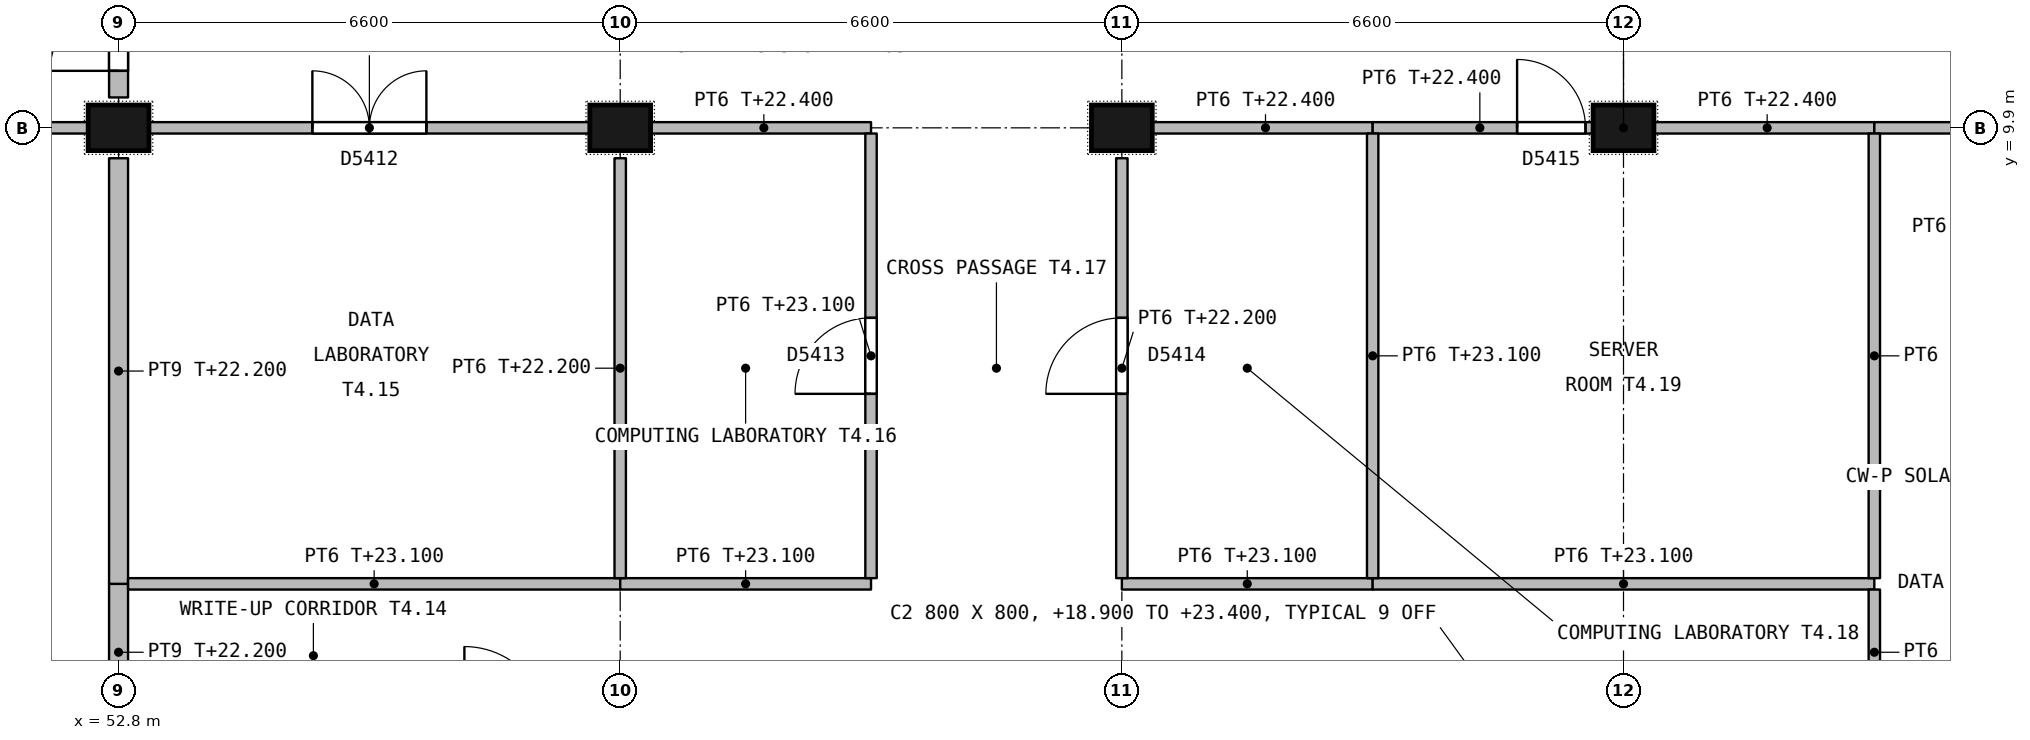
"""IFC4 building model, lengths in metres.
Left out: names, types, materials, properties, quantities, classifications, styles, units other than length and angle.
Written with IfcOpenShell. Run it as: python <this file> out.ifc"""

import sys

from ifc_helpers import new_model, si_unit, direction, frame, frame_2d, origin, origin_2d, place, context, subcontext, project, spatial, rectangle, extrude, element, fill, save


model = new_model("IFC4")
c1 = context("Model", 3, precision=1e-05, world=origin(), true_north=direction((0.0, 1.0)))
c2 = subcontext(c1, "Body", "Model", "MODEL_VIEW")
j1 = project(units=[si_unit("LENGTHUNIT", "METRE"), si_unit("PLANEANGLEUNIT", "RADIAN")], contexts=[c1])
p1 = place(None, origin())
s1 = spatial("IfcSite", under=j1, at=p1, CompositionType="ELEMENT")
p2 = place(p1, origin())
s2 = spatial("IfcBuilding", under=s1, at=p2, CompositionType="ELEMENT")
p3 = place(p2, frame((0.0, 0.0, 18.9)))
s3 = spatial("IfcBuildingStorey", under=s2, at=p3, CompositionType="ELEMENT", Elevation=18.9)
for number, where, z_axis, x_axis in (
    (1, (52.8, 9.9, 0.0), (0.0, 0.0, 1.0), (1.0, 0.0, 0.0)),
    (2, (59.4, 9.9, 0.0), (0.0, 0.0, 1.0), (1.0, 0.0, 0.0)),
    (3, (66.0, 9.9, 0.0), (0.0, 0.0, 1.0), (1.0, 0.0, 0.0)),
    (4, (72.6, 9.9, 0.0), (0.0, 0.0, 1.0), (1.0, 0.0, 0.0)),
):
    element("IfcColumn", number, at=place(p3, frame(where, z_axis=z_axis, x_axis=x_axis)), inside=s3, PredefinedType="COLUMN", context=c2, shape_type="SweptSolid", body=[
        extrude(rectangle(XDim=0.8, YDim=0.6, at=origin_2d()), origin(), (0.0, 0.0, 1.0), 4.5),
    ])
p4 = place(p3, frame((46.55, 9.9, 0.0), z_axis=(0.0, 0.0, 1.0), x_axis=(1.0, 0.0, 0.0)))
e5 = element("IfcWall", 5, at=p4, inside=s3, PredefinedType="PARTITIONING", context=c2, shape_type="SweptSolid", body=[
    extrude(rectangle(XDim=5.85, YDim=0.15, at=frame_2d((2.925, 0.0))), origin(), (0.0, 0.0, 1.0), 3.5),
])
p5 = place(p4, frame((2.2, 0.0, 0.0)))
e6 = element("IfcOpeningElement", 6, at=p5, cuts=e5, PredefinedType="OPENING", context=c2, shape_type="SweptSolid", body=[
    extrude(rectangle(XDim=1.5, YDim=2.1, at=frame_2d((0.75, 1.05))), frame((0.0, 0.085, 0.0), z_axis=(0.0, -1.0, 0.0), x_axis=(1.0, 0.0, 0.0)), (0.0, 0.0, 1.0), 0.17),
])
p6 = place(p3, frame((52.8, 10.3, 0.0), z_axis=(0.0, 0.0, 1.0), x_axis=(0.0, 1.0, 0.0)))
e7 = element("IfcWall", 7, at=p6, inside=s3, PredefinedType="PARTITIONING", context=c2, shape_type="SweptSolid", body=[
    extrude(rectangle(XDim=2.5, YDim=0.25, at=frame_2d((1.25, 0.0))), origin(), (0.0, 0.0, 1.0), 3.6),
])
p7 = place(p6, frame((0.35, 0.0, 0.0)))
e8 = element("IfcOpeningElement", 8, at=p7, cuts=e7, PredefinedType="OPENING", context=c2, shape_type="SweptSolid", body=[
    extrude(rectangle(XDim=1.8, YDim=2.1, at=frame_2d((0.9, 1.05))), frame((0.0, 0.135, 0.0), z_axis=(0.0, -1.0, 0.0), x_axis=(1.0, 0.0, 0.0)), (0.0, 0.0, 1.0), 0.27),
])
p8 = place(p3, frame((52.8, 2.1, 0.0), z_axis=(0.0, 0.0, 1.0), x_axis=(0.0, 1.0, 0.0)))
e9 = element("IfcWall", 9, at=p8, inside=s3, PredefinedType="PARTITIONING", context=c2, shape_type="SweptSolid", body=[
    extrude(rectangle(XDim=1.8, YDim=0.25, at=frame_2d((0.9, 0.0))), origin(), (0.0, 0.0, 1.0), 3.3),
])
p9 = place(p3, frame((52.8, 3.9, 0.0), z_axis=(0.0, 0.0, 1.0), x_axis=(0.0, 1.0, 0.0)))
e10 = element("IfcWall", 10, at=p9, inside=s3, PredefinedType="PARTITIONING", context=c2, shape_type="SweptSolid", body=[
    extrude(rectangle(XDim=5.6, YDim=0.25, at=frame_2d((2.8, 0.0))), origin(), (0.0, 0.0, 1.0), 3.3),
])
p10 = place(p3, frame((53.2, 9.9, 0.0), z_axis=(0.0, 0.0, 1.0), x_axis=(1.0, 0.0, 0.0)))
e11 = element("IfcWall", 11, at=p10, inside=s3, PredefinedType="PARTITIONING", context=c2, shape_type="SweptSolid", body=[
    extrude(rectangle(XDim=5.8, YDim=0.15, at=frame_2d((2.9, 0.0))), origin(), (0.0, 0.0, 1.0), 3.5),
])
p11 = place(p10, frame((2.15, 0.0, 0.0)))
e12 = element("IfcOpeningElement", 12, at=p11, cuts=e11, PredefinedType="OPENING", context=c2, shape_type="SweptSolid", body=[
    extrude(rectangle(XDim=1.5, YDim=2.1, at=frame_2d((0.75, 1.05))), frame((0.0, 0.085, 0.0), z_axis=(0.0, -1.0, 0.0), x_axis=(1.0, 0.0, 0.0)), (0.0, 0.0, 1.0), 0.17),
])
p12 = place(p3, frame((59.8, 9.9, 0.0), z_axis=(0.0, 0.0, 1.0), x_axis=(1.0, 0.0, 0.0)))
e13 = element("IfcWall", 13, at=p12, inside=s3, PredefinedType="PARTITIONING", context=c2, shape_type="SweptSolid", body=[
    extrude(rectangle(XDim=2.9, YDim=0.15, at=frame_2d((1.45, 0.0))), origin(), (0.0, 0.0, 1.0), 3.5),
])
p13 = place(p3, frame((66.4, 9.9, 0.0), z_axis=(0.0, 0.0, 1.0), x_axis=(1.0, 0.0, 0.0)))
e14 = element("IfcWall", 14, at=p13, inside=s3, PredefinedType="PARTITIONING", context=c2, shape_type="SweptSolid", body=[
    extrude(rectangle(XDim=2.9, YDim=0.15, at=frame_2d((1.45, 0.0))), origin(), (0.0, 0.0, 1.0), 3.5),
])
p14 = place(p3, frame((69.3, 9.9, 0.0), z_axis=(0.0, 0.0, 1.0), x_axis=(1.0, 0.0, 0.0)))
e15 = element("IfcWall", 15, at=p14, inside=s3, PredefinedType="PARTITIONING", context=c2, shape_type="SweptSolid", body=[
    extrude(rectangle(XDim=2.9, YDim=0.15, at=frame_2d((1.45, 0.0))), origin(), (0.0, 0.0, 1.0), 3.5),
])
p15 = place(p14, frame((1.9, 0.0, 0.0)))
e16 = element("IfcOpeningElement", 16, at=p15, cuts=e15, PredefinedType="OPENING", context=c2, shape_type="SweptSolid", body=[
    extrude(rectangle(XDim=0.9, YDim=2.1, at=frame_2d((0.45, 1.05))), frame((0.0, 0.085, 0.0), z_axis=(0.0, -1.0, 0.0), x_axis=(1.0, 0.0, 0.0)), (0.0, 0.0, 1.0), 0.17),
])
p16 = place(p3, frame((73.0, 9.9, 0.0), z_axis=(0.0, 0.0, 1.0), x_axis=(1.0, 0.0, 0.0)))
e17 = element("IfcWall", 17, at=p16, inside=s3, PredefinedType="PARTITIONING", context=c2, shape_type="SweptSolid", body=[
    extrude(rectangle(XDim=2.9, YDim=0.15, at=frame_2d((1.45, 0.0))), origin(), (0.0, 0.0, 1.0), 3.5),
])
p17 = place(p3, frame((75.9, 9.9, 0.0), z_axis=(0.0, 0.0, 1.0), x_axis=(1.0, 0.0, 0.0)))
e18 = element("IfcWall", 18, at=p17, inside=s3, PredefinedType="PARTITIONING", context=c2, shape_type="SweptSolid", body=[
    extrude(rectangle(XDim=2.9, YDim=0.15, at=frame_2d((1.45, 0.0))), origin(), (0.0, 0.0, 1.0), 3.5),
])
p18 = place(p17, frame((1.375, 0.0, 0.0)))
e19 = element("IfcOpeningElement", 19, at=p18, cuts=e18, PredefinedType="OPENING", context=c2, shape_type="SweptSolid", body=[
    extrude(rectangle(XDim=1.0, YDim=2.1, at=frame_2d((0.5, 1.05))), frame((0.0, 0.085, 0.0), z_axis=(0.0, -1.0, 0.0), x_axis=(1.0, 0.0, 0.0)), (0.0, 0.0, 1.0), 0.17),
])
p19 = place(p3, frame((59.4, 3.9, 0.0), z_axis=(0.0, 0.0, 1.0), x_axis=(-1.0, 0.0, 0.0)))
e20 = element("IfcWall", 20, at=p19, inside=s3, PredefinedType="PARTITIONING", context=c2, shape_type="SweptSolid", body=[
    extrude(rectangle(XDim=6.475, YDim=0.15, at=frame_2d((3.237, 0.0))), origin(), (0.0, 0.0, 1.0), 4.2),
])
for number, where, z_axis, x_axis in (
    (21, (62.7, 3.9, 0.0), (0.0, 0.0, 1.0), (-1.0, 0.0, 0.0)),
    (22, (69.3, 3.9, 0.0), (0.0, 0.0, 1.0), (-1.0, 0.0, 0.0)),
):
    element("IfcWall", number, at=place(p3, frame(where, z_axis=z_axis, x_axis=x_axis)), inside=s3, PredefinedType="PARTITIONING", context=c2, shape_type="SweptSolid", body=[
        extrude(rectangle(XDim=3.3, YDim=0.15, at=frame_2d((1.65, 0.0))), origin(), (0.0, 0.0, 1.0), 4.2),
    ])
p20 = place(p3, frame((75.9, 3.9, 0.0), z_axis=(0.0, 0.0, 1.0), x_axis=(-1.0, 0.0, 0.0)))
e23 = element("IfcWall", 23, at=p20, inside=s3, PredefinedType="PARTITIONING", context=c2, shape_type="SweptSolid", body=[
    extrude(rectangle(XDim=6.6, YDim=0.15, at=frame_2d((3.3, 0.0))), origin(), (0.0, 0.0, 1.0), 4.2),
])
p21 = place(p3, frame((75.9, 2.175, 0.0), z_axis=(0.0, 0.0, 1.0), x_axis=(0.0, 1.0, 0.0)))
e24 = element("IfcWall", 24, at=p21, inside=s3, PredefinedType="PARTITIONING", context=c2, shape_type="SweptSolid", body=[
    extrude(rectangle(XDim=1.65, YDim=0.15, at=frame_2d((0.825, 0.0))), origin(), (0.0, 0.0, 1.0), 4.2),
])
p22 = place(p3, frame((59.4, 3.975, 0.0), z_axis=(0.0, 0.0, 1.0), x_axis=(0.0, 1.0, 0.0)))
e25 = element("IfcWall", 25, at=p22, inside=s3, PredefinedType="PARTITIONING", context=c2, shape_type="SweptSolid", body=[
    extrude(rectangle(XDim=5.525, YDim=0.15, at=frame_2d((2.762, 0.0))), origin(), (0.0, 0.0, 1.0), 3.3),
])
p23 = place(p3, frame((62.7, 9.825, 0.0), z_axis=(0.0, 0.0, 1.0), x_axis=(0.0, -1.0, 0.0)))
e26 = element("IfcWall", 26, at=p23, inside=s3, PredefinedType="PARTITIONING", context=c2, shape_type="SweptSolid", body=[
    extrude(rectangle(XDim=5.85, YDim=0.15, at=frame_2d((2.925, 0.0))), origin(), (0.0, 0.0, 1.0), 4.2),
])
p24 = place(p23, frame((2.425, 0.0, 0.0)))
e27 = element("IfcOpeningElement", 27, at=p24, cuts=e26, PredefinedType="OPENING", context=c2, shape_type="SweptSolid", body=[
    extrude(rectangle(XDim=1.0, YDim=2.1, at=frame_2d((0.5, 1.05))), frame((0.0, 0.085, 0.0), z_axis=(0.0, -1.0, 0.0), x_axis=(1.0, 0.0, 0.0)), (0.0, 0.0, 1.0), 0.17),
])
p25 = place(p3, frame((66.0, 3.975, 0.0), z_axis=(0.0, 0.0, 1.0), x_axis=(0.0, 1.0, 0.0)))
e28 = element("IfcWall", 28, at=p25, inside=s3, PredefinedType="PARTITIONING", context=c2, shape_type="SweptSolid", body=[
    extrude(rectangle(XDim=5.525, YDim=0.15, at=frame_2d((2.762, 0.0))), origin(), (0.0, 0.0, 1.0), 3.3),
])
p26 = place(p25, frame((2.425, 0.0, 0.0)))
e29 = element("IfcOpeningElement", 29, at=p26, cuts=e28, PredefinedType="OPENING", context=c2, shape_type="SweptSolid", body=[
    extrude(rectangle(XDim=1.0, YDim=2.1, at=frame_2d((0.5, 1.05))), frame((0.0, 0.085, 0.0), z_axis=(0.0, -1.0, 0.0), x_axis=(1.0, 0.0, 0.0)), (0.0, 0.0, 1.0), 0.17),
])
for number, where, z_axis, x_axis in (
    (30, (69.3, 3.975, 0.0), (0.0, 0.0, 1.0), (0.0, 1.0, 0.0)),
    (31, (75.9, 3.975, 0.0), (0.0, 0.0, 1.0), (0.0, 1.0, 0.0)),
):
    element("IfcWall", number, at=place(p3, frame(where, z_axis=z_axis, x_axis=x_axis)), inside=s3, PredefinedType="PARTITIONING", context=c2, shape_type="SweptSolid", body=[
        extrude(rectangle(XDim=5.85, YDim=0.15, at=frame_2d((2.925, 0.0))), origin(), (0.0, 0.0, 1.0), 4.2),
    ])
p27 = place(p7, origin())
e32 = element("IfcDoor", 32, at=p27, inside=s3, OperationType="DOUBLE_DOOR_SINGLE_SWING", PredefinedType="DOOR", context=c2, shape_type="SweptSolid", body=[
    extrude(rectangle(XDim=1.8, YDim=2.1, at=frame_2d((0.9, 1.05))), frame((0.0, 0.03, 0.0), z_axis=(0.0, -1.0, 0.0), x_axis=(1.0, 0.0, 0.0)), (0.0, 0.0, 1.0), 0.06),
])
fill(e8, e32)
p28 = place(p11, origin())
e33 = element("IfcDoor", 33, at=p28, inside=s3, OperationType="DOUBLE_DOOR_SINGLE_SWING", PredefinedType="DOOR", context=c2, shape_type="SweptSolid", body=[
    extrude(rectangle(XDim=1.5, YDim=2.1, at=frame_2d((0.75, 1.05))), frame((0.0, 0.027, 0.0), z_axis=(0.0, -1.0, 0.0), x_axis=(1.0, 0.0, 0.0)), (0.0, 0.0, 1.0), 0.054),
])
fill(e12, e33)
p29 = place(p24, origin())
e34 = element("IfcDoor", 34, at=p29, inside=s3, OperationType="SINGLE_SWING_RIGHT", PredefinedType="DOOR", context=c2, shape_type="SweptSolid", body=[
    extrude(rectangle(XDim=1.0, YDim=2.1, at=frame_2d((0.5, 1.05))), frame((0.0, 0.027, 0.0), z_axis=(0.0, -1.0, 0.0), x_axis=(1.0, 0.0, 0.0)), (0.0, 0.0, 1.0), 0.054),
])
fill(e27, e34)
p30 = place(p26, origin())
e35 = element("IfcDoor", 35, at=p30, inside=s3, OperationType="SINGLE_SWING_LEFT", PredefinedType="DOOR", context=c2, shape_type="SweptSolid", body=[
    extrude(rectangle(XDim=1.0, YDim=2.1, at=frame_2d((0.5, 1.05))), frame((0.0, 0.027, 0.0), z_axis=(0.0, -1.0, 0.0), x_axis=(1.0, 0.0, 0.0)), (0.0, 0.0, 1.0), 0.054),
])
fill(e29, e35)
p31 = place(p15, origin())
e36 = element("IfcDoor", 36, at=p31, inside=s3, OperationType="SINGLE_SWING_LEFT", PredefinedType="DOOR", context=c2, shape_type="SweptSolid", body=[
    extrude(rectangle(XDim=0.9, YDim=2.1, at=frame_2d((0.45, 1.05))), frame((0.0, 0.03, 0.0), z_axis=(0.0, -1.0, 0.0), x_axis=(1.0, 0.0, 0.0)), (0.0, 0.0, 1.0), 0.06),
])
fill(e16, e36)
save(model, sys.argv[1])
